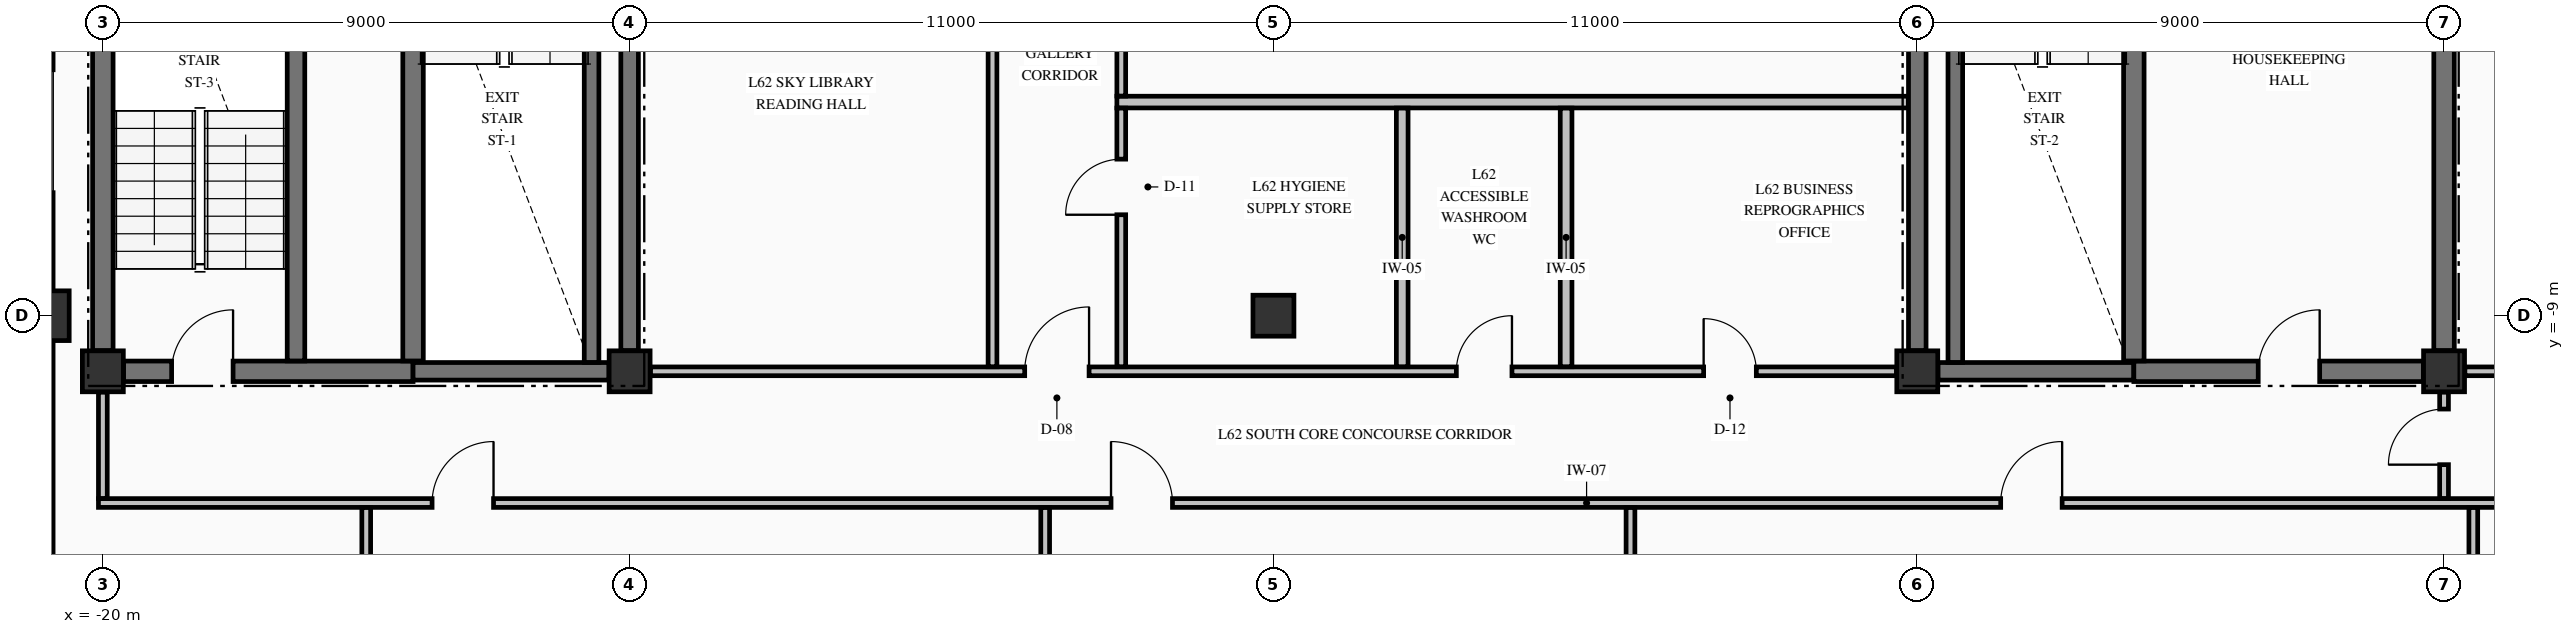
"""IFC4 building model, lengths in metres.
Left out: names, types, materials, properties, quantities, classifications, styles, units other than length and angle.
Written with IfcOpenShell. Run it as: python <this file> out.ifc"""

import sys

from ifc_helpers import new_model, si_unit, direction, frame, frame_2d, origin, origin_2d, place, context, subcontext, project, spatial, rectangle, extrude, element, fill, save


model = new_model("IFC4")
c1 = context("Model", 3, precision=1e-05, world=origin(), true_north=direction((0.0, 1.0)))
c2 = subcontext(c1, "Body", "Model", "MODEL_VIEW")
j1 = project(units=[si_unit("LENGTHUNIT", "METRE"), si_unit("PLANEANGLEUNIT", "RADIAN")], contexts=[c1])
p1 = place(None, origin())
s1 = spatial("IfcSite", under=j1, at=p1, CompositionType="ELEMENT")
p2 = place(p1, origin())
s2 = spatial("IfcBuilding", under=s1, at=p2, CompositionType="ELEMENT")
p3 = place(p2, frame((0.0, 0.0, 236.51)))
s3 = spatial("IfcBuildingStorey", under=s2, at=p3, CompositionType="ELEMENT", Elevation=236.51)
p4 = place(p3, frame((-21.0, -9.0, -0.25), z_axis=(0.0, 0.0, 1.0), x_axis=(1.0, 0.0, 0.0)))
e1 = element("IfcColumn", 1, at=p4, inside=s3, PredefinedType="COLUMN", context=c2, shape_type="SweptSolid", body=[
    extrude(rectangle(XDim=0.85, YDim=0.85, at=origin_2d()), origin(), (0.0, 0.0, 1.0), 3.23),
])
for number, where, z_axis, x_axis in (
    (2, (-20.0, -9.95, -0.25), (0.0, 0.0, 1.0), (1.0, 0.0, 0.0)),
    (3, (-11.0, -9.95, -0.25), (0.0, 0.0, 1.0), (1.0, 0.0, 0.0)),
    (4, (11.0, -9.95, -0.25), (0.0, 0.0, 1.0), (1.0, 0.0, 0.0)),
    (5, (20.0, -9.95, -0.25), (0.0, 0.0, 1.0), (1.0, 0.0, 0.0)),
    (6, (0.0, -9.0, -0.25), (0.0, 0.0, 1.0), (1.0, 0.0, 0.0)),
):
    element("IfcColumn", number, at=place(p3, frame(where, z_axis=z_axis, x_axis=x_axis)), inside=s3, PredefinedType="COLUMN", context=c2, shape_type="SweptSolid", body=[
        extrude(rectangle(XDim=0.7, YDim=0.7, at=origin_2d()), origin(), (0.0, 0.0, 1.0), 3.23),
    ])
p5 = place(p3, frame((-21.0, -9.455, 0.0), z_axis=(0.0, 0.0, 1.0), x_axis=(0.0, -1.0, 0.0)))
e7 = element("IfcWall", 7, at=p5, inside=s3, PredefinedType="STANDARD", context=c2, shape_type="SweptSolid", body=[
    extrude(rectangle(XDim=8.09, YDim=0.3, at=frame_2d((4.045, 0.0))), origin(), (0.0, 0.0, 1.0), 2.372),
])
p6 = place(p3, frame((-21.0, -0.455, 0.0), z_axis=(0.0, 0.0, 1.0), x_axis=(0.0, -1.0, 0.0)))
e8 = element("IfcWall", 8, at=p6, inside=s3, PredefinedType="STANDARD", context=c2, shape_type="SweptSolid", body=[
    extrude(rectangle(XDim=8.09, YDim=0.3, at=frame_2d((4.045, 0.0))), origin(), (0.0, 0.0, 1.0), 2.372),
])
p7 = place(p6, frame((1.647, 0.0, 0.7)))
e9 = element("IfcOpeningElement", 9, at=p7, cuts=e8, PredefinedType="OPENING", context=c2, shape_type="SweptSolid", body=[
    extrude(rectangle(XDim=2.1, YDim=1.5, at=frame_2d((1.05, 0.75))), frame((0.0, 0.16, 0.0), z_axis=(0.0, -1.0, 0.0), x_axis=(1.0, 0.0, 0.0)), (0.0, 0.0, 1.0), 0.32),
])
p8 = place(p6, frame((4.343, 0.0, 0.7)))
e10 = element("IfcOpeningElement", 10, at=p8, cuts=e8, PredefinedType="OPENING", context=c2, shape_type="SweptSolid", body=[
    extrude(rectangle(XDim=2.1, YDim=1.5, at=frame_2d((1.05, 0.75))), frame((0.0, 0.16, 0.0), z_axis=(0.0, -1.0, 0.0), x_axis=(1.0, 0.0, 0.0)), (0.0, 0.0, 1.0), 0.32),
])
p9 = place(p3, frame((-19.646, -9.95, 0.0), z_axis=(0.0, 0.0, 1.0), x_axis=(1.0, 0.0, 0.0)))
e11 = element("IfcWall", 11, at=p9, inside=s3, PredefinedType="SHEAR", context=c2, shape_type="SweptSolid", body=[
    extrude(rectangle(XDim=4.946, YDim=0.35, at=frame_2d((2.473, 0.0))), origin(), (0.0, 0.0, 1.0), 2.98),
])
p10 = place(p9, frame((0.821, 0.0, 0.0)))
e12 = element("IfcOpeningElement", 12, at=p10, cuts=e11, PredefinedType="OPENING", context=c2, shape_type="SweptSolid", body=[
    extrude(rectangle(XDim=1.05, YDim=2.15, at=frame_2d((0.525, 1.075))), frame((0.0, 0.185, 0.0), z_axis=(0.0, -1.0, 0.0), x_axis=(1.0, 0.0, 0.0)), (0.0, 0.0, 1.0), 0.37),
])
for number, where, z_axis, x_axis in (
    (13, (-14.7, -9.95, 0.0), (0.0, 0.0, 1.0), (1.0, 0.0, 0.0)),
    (14, (11.354, -9.95, 0.0), (0.0, 0.0, 1.0), (1.0, 0.0, 0.0)),
):
    element("IfcWall", number, at=place(p3, frame(where, z_axis=z_axis, x_axis=x_axis)), inside=s3, PredefinedType="SHEAR", context=c2, shape_type="SweptSolid", body=[
        extrude(rectangle(XDim=3.346, YDim=0.3, at=frame_2d((1.673, 0.0))), origin(), (0.0, 0.0, 1.0), 2.98),
    ])
p11 = place(p3, frame((14.7, -9.95, 0.0), z_axis=(0.0, 0.0, 1.0), x_axis=(1.0, 0.0, 0.0)))
e15 = element("IfcWall", 15, at=p11, inside=s3, PredefinedType="SHEAR", context=c2, shape_type="SweptSolid", body=[
    extrude(rectangle(XDim=4.946, YDim=0.35, at=frame_2d((2.473, 0.0))), origin(), (0.0, 0.0, 1.0), 2.98),
])
p12 = place(p11, frame((2.125, 0.0, 0.0)))
e16 = element("IfcOpeningElement", 16, at=p12, cuts=e15, PredefinedType="OPENING", context=c2, shape_type="SweptSolid", body=[
    extrude(rectangle(XDim=1.05, YDim=2.15, at=frame_2d((0.525, 1.075))), frame((0.0, 0.185, 0.0), z_axis=(0.0, -1.0, 0.0), x_axis=(1.0, 0.0, 0.0)), (0.0, 0.0, 1.0), 0.37),
])
p13 = place(p3, frame((-20.075, -12.2, 0.0), z_axis=(0.0, 0.0, 1.0), x_axis=(1.0, 0.0, 0.0)))
e17 = element("IfcWall", 17, at=p13, inside=s3, PredefinedType="PARTITIONING", context=c2, shape_type="SweptSolid", body=[
    extrude(rectangle(XDim=45.91, YDim=0.15, at=frame_2d((22.955, 0.0))), origin(), (0.0, 0.0, 1.0), 2.98),
])
p14 = place(p13, frame((5.7, 0.0, 0.0)))
e18 = element("IfcOpeningElement", 18, at=p14, cuts=e17, PredefinedType="OPENING", context=c2, shape_type="SweptSolid", body=[
    extrude(rectangle(XDim=1.05, YDim=2.15, at=frame_2d((0.525, 1.075))), frame((0.0, 0.085, 0.0), z_axis=(0.0, -1.0, 0.0), x_axis=(1.0, 0.0, 0.0)), (0.0, 0.0, 1.0), 0.17),
])
p15 = place(p13, frame((17.3, 0.0, 0.0)))
e19 = element("IfcOpeningElement", 19, at=p15, cuts=e17, PredefinedType="OPENING", context=c2, shape_type="SweptSolid", body=[
    extrude(rectangle(XDim=1.05, YDim=2.15, at=frame_2d((0.525, 1.075))), frame((0.0, 0.085, 0.0), z_axis=(0.0, -1.0, 0.0), x_axis=(1.0, 0.0, 0.0)), (0.0, 0.0, 1.0), 0.17),
])
p16 = place(p13, frame((32.5, 0.0, 0.0)))
e20 = element("IfcOpeningElement", 20, at=p16, cuts=e17, PredefinedType="OPENING", context=c2, shape_type="SweptSolid", body=[
    extrude(rectangle(XDim=1.05, YDim=2.15, at=frame_2d((0.525, 1.075))), frame((0.0, 0.085, 0.0), z_axis=(0.0, -1.0, 0.0), x_axis=(1.0, 0.0, 0.0)), (0.0, 0.0, 1.0), 0.17),
])
p17 = place(p3, frame((-10.644, -9.95, 0.0), z_axis=(0.0, 0.0, 1.0), x_axis=(1.0, 0.0, 0.0)))
e21 = element("IfcWall", 21, at=p17, inside=s3, PredefinedType="PARTITIONING", context=c2, shape_type="SweptSolid", body=[
    extrude(rectangle(XDim=21.288, YDim=0.15, at=frame_2d((10.644, 0.0))), origin(), (0.0, 0.0, 1.0), 2.98),
])
p18 = place(p17, frame((6.394, 0.0, 0.0)))
e22 = element("IfcOpeningElement", 22, at=p18, cuts=e21, PredefinedType="OPENING", context=c2, shape_type="SweptSolid", body=[
    extrude(rectangle(XDim=1.1, YDim=2.15, at=frame_2d((0.55, 1.075))), frame((0.0, 0.085, 0.0), z_axis=(0.0, -1.0, 0.0), x_axis=(1.0, 0.0, 0.0)), (0.0, 0.0, 1.0), 0.17),
])
p19 = place(p17, frame((13.769, 0.0, 0.0)))
e23 = element("IfcOpeningElement", 23, at=p19, cuts=e21, PredefinedType="OPENING", context=c2, shape_type="SweptSolid", body=[
    extrude(rectangle(XDim=0.95, YDim=2.15, at=frame_2d((0.475, 1.075))), frame((0.0, 0.085, 0.0), z_axis=(0.0, -1.0, 0.0), x_axis=(1.0, 0.0, 0.0)), (0.0, 0.0, 1.0), 0.17),
])
p20 = place(p17, frame((17.994, 0.0, 0.0)))
e24 = element("IfcOpeningElement", 24, at=p20, cuts=e21, PredefinedType="OPENING", context=c2, shape_type="SweptSolid", body=[
    extrude(rectangle(XDim=0.9, YDim=2.15, at=frame_2d((0.45, 1.075))), frame((0.0, 0.085, 0.0), z_axis=(0.0, -1.0, 0.0), x_axis=(1.0, 0.0, 0.0)), (0.0, 0.0, 1.0), 0.17),
])
p21 = place(p3, frame((20.356, -9.95, 0.0), z_axis=(0.0, 0.0, 1.0), x_axis=(1.0, 0.0, 0.0)))
e25 = element("IfcWall", 25, at=p21, inside=s3, PredefinedType="PARTITIONING", context=c2, shape_type="SweptSolid", body=[
    extrude(rectangle(XDim=5.479, YDim=0.15, at=frame_2d((2.74, 0.0))), origin(), (0.0, 0.0, 1.0), 2.98),
])
p22 = place(p21, frame((2.144, 0.0, 0.0)))
e26 = element("IfcOpeningElement", 26, at=p22, cuts=e25, PredefinedType="OPENING", context=c2, shape_type="SweptSolid", body=[
    extrude(rectangle(XDim=1.0, YDim=2.15, at=frame_2d((0.5, 1.075))), frame((0.0, 0.085, 0.0), z_axis=(0.0, -1.0, 0.0), x_axis=(1.0, 0.0, 0.0)), (0.0, 0.0, 1.0), 0.17),
])
p23 = place(p3, frame((-2.675, -5.35, 0.0), z_axis=(0.0, 0.0, 1.0), x_axis=(1.0, 0.0, 0.0)))
e27 = element("IfcWall", 27, at=p23, inside=s3, PredefinedType="PARTITIONING", context=c2, shape_type="SweptSolid", body=[
    extrude(rectangle(XDim=13.522, YDim=0.2, at=frame_2d((6.761, 0.0))), origin(), (0.0, 0.0, 1.0), 2.98),
])
p24 = place(p3, frame((-20.0, -9.596, 0.0), z_axis=(0.0, 0.0, 1.0), x_axis=(0.0, 1.0, 0.0)))
e28 = element("IfcWall", 28, at=p24, inside=s3, PredefinedType="SHEAR", context=c2, shape_type="SweptSolid", body=[
    extrude(rectangle(XDim=9.194, YDim=0.35, at=frame_2d((4.597, 0.0))), origin(), (0.0, 0.0, 1.0), 2.98),
])
p25 = place(p3, frame((-16.7, -9.773, 0.0), z_axis=(0.0, 0.0, 1.0), x_axis=(0.0, 1.0, 0.0)))
e29 = element("IfcWall", 29, at=p25, inside=s3, PredefinedType="SHEAR", context=c2, shape_type="SweptSolid", body=[
    extrude(rectangle(XDim=9.371, YDim=0.3, at=frame_2d((4.686, 0.0))), origin(), (0.0, 0.0, 1.0), 2.98),
])
p26 = place(p3, frame((-14.7, -9.773, 0.0), z_axis=(0.0, 0.0, 1.0), x_axis=(0.0, 1.0, 0.0)))
e30 = element("IfcWall", 30, at=p26, inside=s3, PredefinedType="SHEAR", context=c2, shape_type="SweptSolid", body=[
    extrude(rectangle(XDim=9.371, YDim=0.35, at=frame_2d((4.686, 0.0))), origin(), (0.0, 0.0, 1.0), 2.98),
])
p27 = place(p3, frame((-11.65, -9.798, 0.0), z_axis=(0.0, 0.0, 1.0), x_axis=(0.0, 1.0, 0.0)))
e31 = element("IfcWall", 31, at=p27, inside=s3, PredefinedType="SOLIDWALL", context=c2, shape_type="SweptSolid", body=[
    extrude(rectangle(XDim=9.396, YDim=0.25, at=frame_2d((4.698, 0.0))), origin(), (0.0, 0.0, 1.0), 2.98),
])
for number, where, z_axis, x_axis in (
    (32, (-11.0, -9.596, 0.0), (0.0, 0.0, 1.0), (0.0, 1.0, 0.0)),
    (33, (11.0, -9.596, 0.0), (0.0, 0.0, 1.0), (0.0, 1.0, 0.0)),
):
    element("IfcWall", number, at=place(p3, frame(where, z_axis=z_axis, x_axis=x_axis)), inside=s3, PredefinedType="SHEAR", context=c2, shape_type="SweptSolid", body=[
        extrude(rectangle(XDim=9.242, YDim=0.3, at=frame_2d((4.621, 0.0))), origin(), (0.0, 0.0, 1.0), 2.98),
    ])
p28 = place(p3, frame((11.65, -9.798, 0.0), z_axis=(0.0, 0.0, 1.0), x_axis=(0.0, 1.0, 0.0)))
e34 = element("IfcWall", 34, at=p28, inside=s3, PredefinedType="SOLIDWALL", context=c2, shape_type="SweptSolid", body=[
    extrude(rectangle(XDim=9.396, YDim=0.25, at=frame_2d((4.698, 0.0))), origin(), (0.0, 0.0, 1.0), 2.98),
])
p29 = place(p3, frame((14.7, -9.773, 0.0), z_axis=(0.0, 0.0, 1.0), x_axis=(0.0, 1.0, 0.0)))
e35 = element("IfcWall", 35, at=p29, inside=s3, PredefinedType="SHEAR", context=c2, shape_type="SweptSolid", body=[
    extrude(rectangle(XDim=9.371, YDim=0.35, at=frame_2d((4.686, 0.0))), origin(), (0.0, 0.0, 1.0), 2.98),
])
p30 = place(p3, frame((20.0, -9.596, 0.0), z_axis=(0.0, 0.0, 1.0), x_axis=(0.0, 1.0, 0.0)))
e36 = element("IfcWall", 36, at=p30, inside=s3, PredefinedType="SHEAR", context=c2, shape_type="SweptSolid", body=[
    extrude(rectangle(XDim=9.242, YDim=0.35, at=frame_2d((4.621, 0.0))), origin(), (0.0, 0.0, 1.0), 2.98),
])
p31 = place(p3, frame((-20.0, -12.122, 0.0), z_axis=(0.0, 0.0, 1.0), x_axis=(0.0, 1.0, 0.0)))
e37 = element("IfcWall", 37, at=p31, inside=s3, PredefinedType="PARTITIONING", context=c2, shape_type="SweptSolid", body=[
    extrude(rectangle(XDim=1.816, YDim=0.15, at=frame_2d((0.908, 0.0))), origin(), (0.0, 0.0, 1.0), 2.57),
])
p32 = place(p3, frame((-15.5, -17.569, 0.0), z_axis=(0.0, 0.0, 1.0), x_axis=(0.0, 1.0, 0.0)))
e38 = element("IfcWall", 38, at=p32, inside=s3, PredefinedType="PARTITIONING", context=c2, shape_type="SweptSolid", body=[
    extrude(rectangle(XDim=5.291, YDim=0.15, at=frame_2d((2.646, 0.0))), origin(), (0.0, 0.0, 1.0), 2.98),
])
p33 = place(p3, frame((-4.8, -9.872, 0.0), z_axis=(0.0, 0.0, 1.0), x_axis=(0.0, 1.0, 0.0)))
e39 = element("IfcWall", 39, at=p33, inside=s3, PredefinedType="PARTITIONING", context=c2, shape_type="SweptSolid", body=[
    extrude(rectangle(XDim=9.544, YDim=0.15, at=frame_2d((4.772, 0.0))), origin(), (0.0, 0.0, 1.0), 2.98),
])
p34 = place(p3, frame((-3.9, -23.335, 0.0), z_axis=(0.0, 0.0, 1.0), x_axis=(0.0, 1.0, 0.0)))
e40 = element("IfcWall", 40, at=p34, inside=s3, PredefinedType="PARTITIONING", context=c2, shape_type="SweptSolid", body=[
    extrude(rectangle(XDim=11.057, YDim=0.15, at=frame_2d((5.528, 0.0))), origin(), (0.0, 0.0, 1.0), 2.98),
])
p35 = place(p3, frame((-2.6, -9.872, 0.0), z_axis=(0.0, 0.0, 1.0), x_axis=(0.0, 1.0, 0.0)))
e41 = element("IfcWall", 41, at=p35, inside=s3, PredefinedType="PARTITIONING", context=c2, shape_type="SweptSolid", body=[
    extrude(rectangle(XDim=4.419, YDim=0.15, at=frame_2d((2.209, 0.0))), origin(), (0.0, 0.0, 1.0), 2.98),
])
p36 = place(p35, frame((2.597, 0.0, 0.0)))
e42 = element("IfcOpeningElement", 42, at=p36, cuts=e41, PredefinedType="OPENING", context=c2, shape_type="SweptSolid", body=[
    extrude(rectangle(XDim=0.95, YDim=2.15, at=frame_2d((0.475, 1.075))), frame((0.0, 0.085, 0.0), z_axis=(0.0, -1.0, 0.0), x_axis=(1.0, 0.0, 0.0)), (0.0, 0.0, 1.0), 0.17),
])
p37 = place(p3, frame((-2.6, -5.247, 0.0), z_axis=(0.0, 0.0, 1.0), x_axis=(0.0, 1.0, 0.0)))
e43 = element("IfcWall", 43, at=p37, inside=s3, PredefinedType="PARTITIONING", context=c2, shape_type="SweptSolid", body=[
    extrude(rectangle(XDim=4.919, YDim=0.15, at=frame_2d((2.459, 0.0))), origin(), (0.0, 0.0, 1.0), 2.98),
])
for number, where, z_axis, x_axis in (
    (44, (2.2, -9.872, 0.0), (0.0, 0.0, 1.0), (0.0, 1.0, 0.0)),
    (45, (5.0, -9.872, 0.0), (0.0, 0.0, 1.0), (0.0, 1.0, 0.0)),
):
    element("IfcWall", number, at=place(p3, frame(where, z_axis=z_axis, x_axis=x_axis)), inside=s3, PredefinedType="PARTITIONING", context=c2, shape_type="SweptSolid", body=[
        extrude(rectangle(XDim=4.419, YDim=0.2, at=frame_2d((2.209, 0.0))), origin(), (0.0, 0.0, 1.0), 2.98),
    ])
p38 = place(p3, frame((6.1, -23.335, 0.0), z_axis=(0.0, 0.0, 1.0), x_axis=(0.0, 1.0, 0.0)))
e46 = element("IfcWall", 46, at=p38, inside=s3, PredefinedType="PARTITIONING", context=c2, shape_type="SweptSolid", body=[
    extrude(rectangle(XDim=11.057, YDim=0.15, at=frame_2d((5.528, 0.0))), origin(), (0.0, 0.0, 1.0), 2.98),
])
p39 = place(p3, frame((20.0, -12.122, 0.0), z_axis=(0.0, 0.0, 1.0), x_axis=(0.0, 1.0, 0.0)))
e47 = element("IfcWall", 47, at=p39, inside=s3, PredefinedType="PARTITIONING", context=c2, shape_type="SweptSolid", body=[
    extrude(rectangle(XDim=1.816, YDim=0.15, at=frame_2d((0.908, 0.0))), origin(), (0.0, 0.0, 1.0), 2.98),
])
p40 = place(p39, frame((0.577, 0.0, 0.0)))
e48 = element("IfcOpeningElement", 48, at=p40, cuts=e47, PredefinedType="OPENING", context=c2, shape_type="SweptSolid", body=[
    extrude(rectangle(XDim=0.95, YDim=2.15, at=frame_2d((0.475, 1.075))), frame((0.0, 0.085, 0.0), z_axis=(0.0, -1.0, 0.0), x_axis=(1.0, 0.0, 0.0)), (0.0, 0.0, 1.0), 0.17),
])
p41 = place(p3, frame((20.5, -17.569, 0.0), z_axis=(0.0, 0.0, 1.0), x_axis=(0.0, 1.0, 0.0)))
e49 = element("IfcWall", 49, at=p41, inside=s3, PredefinedType="PARTITIONING", context=c2, shape_type="SweptSolid", body=[
    extrude(rectangle(XDim=5.291, YDim=0.15, at=frame_2d((2.646, 0.0))), origin(), (0.0, 0.0, 1.0), 2.98),
])
p42 = place(p10, origin())
e50 = element("IfcDoor", 50, at=p42, inside=s3, OperationType="SINGLE_SWING_RIGHT", PredefinedType="DOOR", context=c2, shape_type="SweptSolid", body=[
    extrude(rectangle(XDim=1.05, YDim=2.15, at=frame_2d((0.525, 1.075))), frame((0.0, 0.025, 0.0), z_axis=(0.0, -1.0, 0.0), x_axis=(1.0, 0.0, 0.0)), (0.0, 0.0, 1.0), 0.05),
])
fill(e12, e50)
p43 = place(p12, origin())
e51 = element("IfcDoor", 51, at=p43, inside=s3, OperationType="SINGLE_SWING_RIGHT", PredefinedType="DOOR", context=c2, shape_type="SweptSolid", body=[
    extrude(rectangle(XDim=1.05, YDim=2.15, at=frame_2d((0.525, 1.075))), frame((0.0, 0.025, 0.0), z_axis=(0.0, -1.0, 0.0), x_axis=(1.0, 0.0, 0.0)), (0.0, 0.0, 1.0), 0.05),
])
fill(e16, e51)
p44 = place(p18, origin())
e52 = element("IfcDoor", 52, at=p44, inside=s3, OperationType="SINGLE_SWING_RIGHT", PredefinedType="DOOR", context=c2, shape_type="SweptSolid", body=[
    extrude(rectangle(XDim=1.1, YDim=2.15, at=frame_2d((0.55, 1.075))), frame((0.0, 0.025, 0.0), z_axis=(0.0, -1.0, 0.0), x_axis=(1.0, 0.0, 0.0)), (0.0, 0.0, 1.0), 0.05),
])
fill(e22, e52)
p45 = place(p14, origin())
e53 = element("IfcDoor", 53, at=p45, inside=s3, OperationType="SINGLE_SWING_RIGHT", PredefinedType="DOOR", context=c2, shape_type="SweptSolid", body=[
    extrude(rectangle(XDim=1.05, YDim=2.15, at=frame_2d((0.525, 1.075))), frame((0.0, 0.025, 0.0), z_axis=(0.0, -1.0, 0.0), x_axis=(1.0, 0.0, 0.0)), (0.0, 0.0, 1.0), 0.05),
])
fill(e18, e53)
p46 = place(p15, origin())
e54 = element("IfcDoor", 54, at=p46, inside=s3, OperationType="SINGLE_SWING_LEFT", PredefinedType="DOOR", context=c2, shape_type="SweptSolid", body=[
    extrude(rectangle(XDim=1.05, YDim=2.15, at=frame_2d((0.525, 1.075))), frame((0.0, 0.025, 0.0), z_axis=(0.0, -1.0, 0.0), x_axis=(1.0, 0.0, 0.0)), (0.0, 0.0, 1.0), 0.05),
])
fill(e19, e54)
p47 = place(p16, origin())
e55 = element("IfcDoor", 55, at=p47, inside=s3, OperationType="SINGLE_SWING_RIGHT", PredefinedType="DOOR", context=c2, shape_type="SweptSolid", body=[
    extrude(rectangle(XDim=1.05, YDim=2.15, at=frame_2d((0.525, 1.075))), frame((0.0, 0.025, 0.0), z_axis=(0.0, -1.0, 0.0), x_axis=(1.0, 0.0, 0.0)), (0.0, 0.0, 1.0), 0.05),
])
fill(e20, e55)
p48 = place(p36, origin())
e56 = element("IfcDoor", 56, at=p48, inside=s3, OperationType="SINGLE_SWING_LEFT", PredefinedType="DOOR", context=c2, shape_type="SweptSolid", body=[
    extrude(rectangle(XDim=0.95, YDim=2.15, at=frame_2d((0.475, 1.075))), frame((0.0, 0.025, 0.0), z_axis=(0.0, -1.0, 0.0), x_axis=(1.0, 0.0, 0.0)), (0.0, 0.0, 1.0), 0.05),
])
fill(e42, e56)
p49 = place(p19, origin())
e57 = element("IfcDoor", 57, at=p49, inside=s3, OperationType="SINGLE_SWING_RIGHT", PredefinedType="DOOR", context=c2, shape_type="SweptSolid", body=[
    extrude(rectangle(XDim=0.95, YDim=2.15, at=frame_2d((0.475, 1.075))), frame((0.0, 0.025, 0.0), z_axis=(0.0, -1.0, 0.0), x_axis=(1.0, 0.0, 0.0)), (0.0, 0.0, 1.0), 0.05),
])
fill(e23, e57)
p50 = place(p20, origin())
e58 = element("IfcDoor", 58, at=p50, inside=s3, OperationType="SINGLE_SWING_LEFT", PredefinedType="DOOR", context=c2, shape_type="SweptSolid", body=[
    extrude(rectangle(XDim=0.9, YDim=2.15, at=frame_2d((0.45, 1.075))), frame((0.0, 0.025, 0.0), z_axis=(0.0, -1.0, 0.0), x_axis=(1.0, 0.0, 0.0)), (0.0, 0.0, 1.0), 0.05),
])
fill(e24, e58)
p51 = place(p40, origin())
e59 = element("IfcDoor", 59, at=p51, inside=s3, OperationType="SINGLE_SWING_LEFT", PredefinedType="DOOR", context=c2, shape_type="SweptSolid", body=[
    extrude(rectangle(XDim=0.95, YDim=2.15, at=frame_2d((0.475, 1.075))), frame((0.0, 0.025, 0.0), z_axis=(0.0, -1.0, 0.0), x_axis=(1.0, 0.0, 0.0)), (0.0, 0.0, 1.0), 0.05),
])
fill(e48, e59)
save(model, sys.argv[1])
